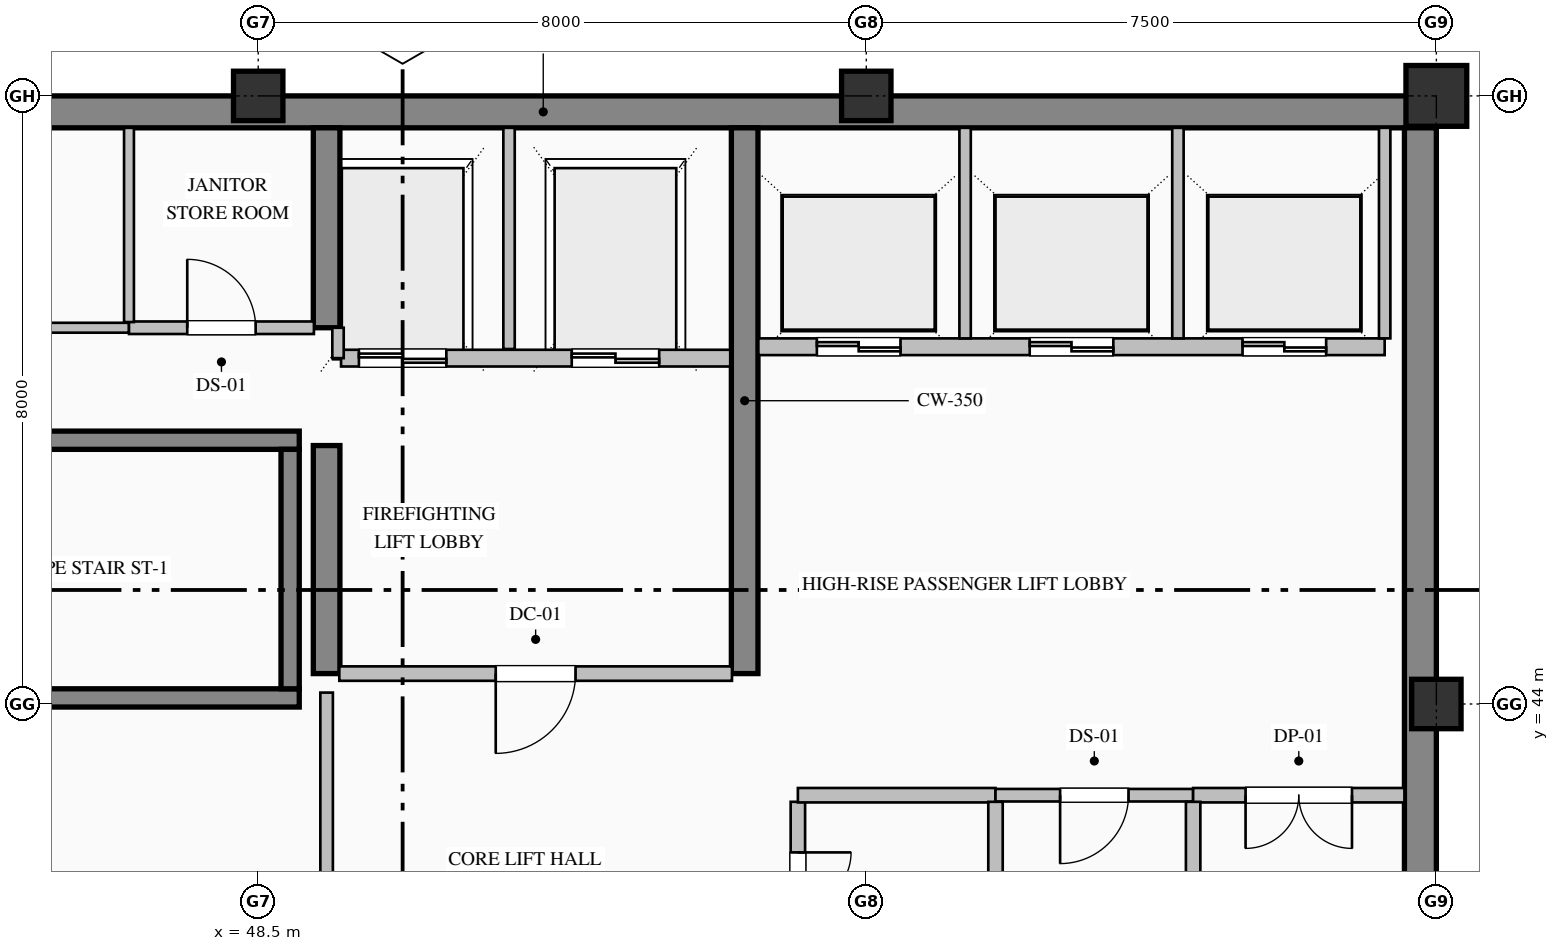
"""IFC4 building model, lengths in metres.
Left out: names, types, materials, properties, quantities, classifications, styles, units other than length and angle.
Written with IfcOpenShell. Run it as: python <this file> out.ifc"""

import sys

from ifc_helpers import new_model, si_unit, direction, frame, frame_2d, origin, origin_2d, place, context, subcontext, project, spatial, rectangle, hollow_rectangle, extrude, element, fill, save


model = new_model("IFC4")
c1 = context("Model", 3, precision=1e-05, world=origin(), true_north=direction((0.0, 1.0)))
c2 = subcontext(c1, "Body", "Model", "MODEL_VIEW")
j1 = project(units=[si_unit("LENGTHUNIT", "METRE"), si_unit("PLANEANGLEUNIT", "RADIAN")], contexts=[c1])
p1 = place(None, origin())
s1 = spatial("IfcSite", under=j1, at=p1, CompositionType="ELEMENT")
p2 = place(p1, origin())
s2 = spatial("IfcBuilding", under=s1, at=p2, CompositionType="ELEMENT")
p3 = place(p2, frame((0.0, 0.0, 291.2)))
s3 = spatial("IfcBuildingStorey", under=s2, at=p3, CompositionType="ELEMENT", Elevation=291.2)
p4 = place(p3, frame((40.5, 51.79, 0.0), z_axis=(0.0, 0.0, 1.0), x_axis=(1.0, 0.0, 0.0)))
e1 = element("IfcWall", 1, at=p4, inside=s3, PredefinedType="SHEAR", context=c2, shape_type="SweptSolid", body=[
    extrude(rectangle(XDim=23.5, YDim=0.42, at=frame_2d((11.75, 0.0))), origin(), (0.0, 0.0, 1.0), 3.785),
])
p5 = place(p3, frame((63.79, 36.32, 0.0), z_axis=(0.0, 0.0, 1.0), x_axis=(0.0, 1.0, 0.0)))
e2 = element("IfcWall", 2, at=p5, inside=s3, PredefinedType="SHEAR", context=c2, shape_type="SweptSolid", body=[
    extrude(rectangle(XDim=15.26, YDim=0.42, at=frame_2d((7.63, 0.0))), origin(), (0.0, 0.0, 1.0), 3.785),
])
p6 = place(p3, frame((49.4, 44.4, 0.0), z_axis=(0.0, 0.0, 1.0), x_axis=(0.0, 1.0, 0.0)))
e3 = element("IfcWall", 3, at=p6, inside=s3, PredefinedType="SHEAR", context=c2, shape_type="SweptSolid", body=[
    extrude(rectangle(XDim=3.0, YDim=0.35, at=frame_2d((1.5, 0.0))), origin(), (0.0, 0.0, 1.0), 3.785),
])
p7 = place(p3, frame((49.4, 48.95, 0.0), z_axis=(0.0, 0.0, 1.0), x_axis=(0.0, 1.0, 0.0)))
e4 = element("IfcWall", 4, at=p7, inside=s3, PredefinedType="SHEAR", context=c2, shape_type="SweptSolid", body=[
    extrude(rectangle(XDim=2.63, YDim=0.35, at=frame_2d((1.315, 0.0))), origin(), (0.0, 0.0, 1.0), 3.785),
])
p8 = place(p3, frame((54.9, 44.4, 0.0), z_axis=(0.0, 0.0, 1.0), x_axis=(0.0, 1.0, 0.0)))
e5 = element("IfcWall", 5, at=p8, inside=s3, PredefinedType="SHEAR", context=c2, shape_type="SweptSolid", body=[
    extrude(rectangle(XDim=7.18, YDim=0.35, at=frame_2d((3.59, 0.0))), origin(), (0.0, 0.0, 1.0), 3.785),
])
for number, where, z_axis, x_axis in (
    (6, (48.5, 52.0, 0.0), (0.0, 0.0, 1.0), (1.0, 0.0, 0.0)),
    (7, (56.5, 52.0, 0.0), (0.0, 0.0, 1.0), (1.0, 0.0, 0.0)),
    (8, (64.0, 44.0, 0.0), (0.0, 0.0, 1.0), (1.0, 0.0, 0.0)),
):
    element("IfcColumn", number, at=place(p3, frame(where, z_axis=z_axis, x_axis=x_axis)), inside=s3, PredefinedType="COLUMN", context=c2, shape_type="SweptSolid", body=[
        extrude(hollow_rectangle(XDim=0.65, YDim=0.65, WallThickness=0.028, at=origin_2d()), origin(), (0.0, 0.0, 1.0), 4.0),
    ])
p9 = place(p3, frame((64.0, 52.0, 0.0), z_axis=(0.0, 0.0, 1.0), x_axis=(1.0, 0.0, 0.0)))
e9 = element("IfcColumn", 9, at=p9, inside=s3, PredefinedType="COLUMN", context=c2, shape_type="SweptSolid", body=[
    extrude(hollow_rectangle(XDim=0.8, YDim=0.8, WallThickness=0.032, at=origin_2d()), origin(), (0.0, 0.0, 1.0), 4.0),
])
for number, where, z_axis, x_axis in (
    (10, (40.96, 47.47, 0.0), (0.0, 0.0, 1.0), (1.0, 0.0, 0.0)),
    (11, (49.04, 44.08, 0.0), (0.0, 0.0, 1.0), (-1.0, 0.0, 0.0)),
):
    element("IfcWall", number, at=place(p3, frame(where, z_axis=z_axis, x_axis=x_axis)), inside=s3, PredefinedType="SOLIDWALL", context=c2, shape_type="SweptSolid", body=[
        extrude(rectangle(XDim=8.08, YDim=0.24, at=frame_2d((4.04, 0.0))), origin(), (0.0, 0.0, 1.0), 4.0),
    ])
p10 = place(p3, frame((48.92, 44.2, 0.0), z_axis=(0.0, 0.0, 1.0), x_axis=(0.0, 1.0, 0.0)))
e12 = element("IfcWall", 12, at=p10, inside=s3, PredefinedType="SOLIDWALL", context=c2, shape_type="SweptSolid", body=[
    extrude(rectangle(XDim=3.15, YDim=0.24, at=frame_2d((1.575, 0.0))), origin(), (0.0, 0.0, 1.0), 4.0),
])
p11 = place(p3, frame((54.71, 48.55, 0.0), z_axis=(0.0, 0.0, 1.0), x_axis=(-1.0, 0.0, 0.0)))
e13 = element("IfcWall", 13, at=p11, inside=s3, PredefinedType="PARTITIONING", context=c2, shape_type="SweptSolid", body=[
    extrude(rectangle(XDim=5.12, YDim=0.22, at=frame_2d((2.56, 0.0))), origin(), (0.0, 0.0, 1.0), 3.785),
])
p12 = place(p11, frame((3.735, 0.0, 0.0)))
e14 = element("IfcOpeningElement", 14, at=p12, cuts=e13, PredefinedType="OPENING", context=c2, shape_type="SweptSolid", body=[
    extrude(rectangle(XDim=1.15, YDim=2.2, at=frame_2d((0.575, 1.1))), frame((0.0, 0.12, 0.0), z_axis=(0.0, -1.0, 0.0), x_axis=(1.0, 0.0, 0.0)), (0.0, 0.0, 1.0), 0.24),
])
p13 = place(p11, frame((0.935, 0.0, 0.0)))
e15 = element("IfcOpeningElement", 15, at=p13, cuts=e13, PredefinedType="OPENING", context=c2, shape_type="SweptSolid", body=[
    extrude(rectangle(XDim=1.15, YDim=2.2, at=frame_2d((0.575, 1.1))), frame((0.0, 0.12, 0.0), z_axis=(0.0, -1.0, 0.0), x_axis=(1.0, 0.0, 0.0)), (0.0, 0.0, 1.0), 0.24),
])
p14 = place(p3, frame((51.8, 48.67, 0.0), z_axis=(0.0, 0.0, 1.0), x_axis=(0.0, 1.0, 0.0)))
e16 = element("IfcWall", 16, at=p14, inside=s3, PredefinedType="PARTITIONING", context=c2, shape_type="SweptSolid", body=[
    extrude(rectangle(XDim=2.91, YDim=0.15, at=frame_2d((1.455, 0.0))), origin(), (0.0, 0.0, 1.0), 3.785),
])
p15 = place(p3, frame((49.55, 48.55, 0.0), z_axis=(0.0, 0.0, 1.0), x_axis=(0.0, 1.0, 0.0)))
e17 = element("IfcWall", 17, at=p15, inside=s3, PredefinedType="PARTITIONING", context=c2, shape_type="SweptSolid", body=[
    extrude(rectangle(XDim=0.4, YDim=0.15, at=frame_2d((0.2, 0.0))), origin(), (0.0, 0.0, 1.0), 3.785),
])
p16 = place(p3, frame((63.32, 48.7, 0.0), z_axis=(0.0, 0.0, 1.0), x_axis=(-1.0, 0.0, 0.0)))
e18 = element("IfcWall", 18, at=p16, inside=s3, PredefinedType="PARTITIONING", context=c2, shape_type="SweptSolid", body=[
    extrude(rectangle(XDim=8.24, YDim=0.22, at=frame_2d((4.12, 0.0))), origin(), (0.0, 0.0, 1.0), 3.785),
])
p17 = place(p16, frame((6.37, 0.0, 0.0)))
e19 = element("IfcOpeningElement", 19, at=p17, cuts=e18, PredefinedType="OPENING", context=c2, shape_type="SweptSolid", body=[
    extrude(rectangle(XDim=1.1, YDim=2.2, at=frame_2d((0.55, 1.1))), frame((0.0, 0.12, 0.0), z_axis=(0.0, -1.0, 0.0), x_axis=(1.0, 0.0, 0.0)), (0.0, 0.0, 1.0), 0.24),
])
p18 = place(p16, frame((3.57, 0.0, 0.0)))
e20 = element("IfcOpeningElement", 20, at=p18, cuts=e18, PredefinedType="OPENING", context=c2, shape_type="SweptSolid", body=[
    extrude(rectangle(XDim=1.1, YDim=2.2, at=frame_2d((0.55, 1.1))), frame((0.0, 0.12, 0.0), z_axis=(0.0, -1.0, 0.0), x_axis=(1.0, 0.0, 0.0)), (0.0, 0.0, 1.0), 0.24),
])
p19 = place(p16, frame((0.77, 0.0, 0.0)))
e21 = element("IfcOpeningElement", 21, at=p19, cuts=e18, PredefinedType="OPENING", context=c2, shape_type="SweptSolid", body=[
    extrude(rectangle(XDim=1.1, YDim=2.2, at=frame_2d((0.55, 1.1))), frame((0.0, 0.12, 0.0), z_axis=(0.0, -1.0, 0.0), x_axis=(1.0, 0.0, 0.0)), (0.0, 0.0, 1.0), 0.24),
])
for number, where, z_axis, x_axis in (
    (22, (57.8, 48.81, 0.0), (0.0, 0.0, 1.0), (0.0, 1.0, 0.0)),
    (23, (60.6, 48.81, 0.0), (0.0, 0.0, 1.0), (0.0, 1.0, 0.0)),
    (24, (63.32, 48.81, 0.0), (0.0, 0.0, 1.0), (0.0, 1.0, 0.0)),
):
    element("IfcWall", number, at=place(p3, frame(where, z_axis=z_axis, x_axis=x_axis)), inside=s3, PredefinedType="PARTITIONING", context=c2, shape_type="SweptSolid", body=[
        extrude(rectangle(XDim=2.77, YDim=0.15, at=frame_2d((1.385, 0.0))), origin(), (0.0, 0.0, 1.0), 3.785),
    ])
p20 = place(p3, frame((40.92, 48.95, 0.0), z_axis=(0.0, 0.0, 1.0), x_axis=(1.0, 0.0, 0.0)))
e25 = element("IfcWall", 25, at=p20, inside=s3, PredefinedType="PARTITIONING", context=c2, shape_type="SweptSolid", body=[
    extrude(rectangle(XDim=5.88, YDim=0.13, at=frame_2d((2.94, 0.0))), origin(), (0.0, 0.0, 1.0), 3.785),
])
p21 = place(p20, frame((2.48, 0.0, 0.0)))
e26 = element("IfcOpeningElement", 26, at=p21, cuts=e25, PredefinedType="OPENING", context=c2, shape_type="SweptSolid", body=[
    extrude(rectangle(XDim=0.92, YDim=2.15, at=frame_2d((0.46, 1.075))), frame((0.0, 0.075, 0.0), z_axis=(0.0, -1.0, 0.0), x_axis=(1.0, 0.0, 0.0)), (0.0, 0.0, 1.0), 0.15),
])
p22 = place(p3, frame((46.8, 48.95, 0.0), z_axis=(0.0, 0.0, 1.0), x_axis=(1.0, 0.0, 0.0)))
e27 = element("IfcWall", 27, at=p22, inside=s3, PredefinedType="PARTITIONING", context=c2, shape_type="SweptSolid", body=[
    extrude(rectangle(XDim=2.433, YDim=0.165, at=frame_2d((1.216, 0.0))), origin(), (0.0, 0.0, 1.0), 3.785),
])
p23 = place(p22, frame((0.767, 0.0, 0.0)))
e28 = element("IfcOpeningElement", 28, at=p23, cuts=e27, PredefinedType="OPENING", context=c2, shape_type="SweptSolid", body=[
    extrude(rectangle(XDim=0.9, YDim=2.15, at=frame_2d((0.45, 1.075))), frame((0.0, 0.093, 0.0), z_axis=(0.0, -1.0, 0.0), x_axis=(1.0, 0.0, 0.0)), (0.0, 0.0, 1.0), 0.185),
])
p24 = place(p3, frame((54.733, 44.4, 0.0), z_axis=(0.0, 0.0, 1.0), x_axis=(-1.0, 0.0, 0.0)))
e29 = element("IfcWall", 29, at=p24, inside=s3, PredefinedType="PARTITIONING", context=c2, shape_type="SweptSolid", body=[
    extrude(rectangle(XDim=5.166, YDim=0.19, at=frame_2d((2.583, 0.0))), origin(), (0.0, 0.0, 1.0), 3.785),
])
p25 = place(p24, frame((2.058, 0.0, 0.0)))
e30 = element("IfcOpeningElement", 30, at=p25, cuts=e29, PredefinedType="OPENING", context=c2, shape_type="SweptSolid", body=[
    extrude(rectangle(XDim=1.05, YDim=2.15, at=frame_2d((0.525, 1.075))), frame((0.0, 0.105, 0.0), z_axis=(0.0, -1.0, 0.0), x_axis=(1.0, 0.0, 0.0)), (0.0, 0.0, 1.0), 0.21),
])
p26 = place(p3, frame((49.4, 36.42, 0.0), z_axis=(0.0, 0.0, 1.0), x_axis=(0.0, 1.0, 0.0)))
e31 = element("IfcWall", 31, at=p26, inside=s3, PredefinedType="PARTITIONING", context=c2, shape_type="SweptSolid", body=[
    extrude(rectangle(XDim=7.73, YDim=0.165, at=frame_2d((3.865, 0.0))), origin(), (0.0, 0.0, 1.0), 3.027),
])
p27 = place(p26, frame((3.365, 0.0, 0.0)))
e32 = element("IfcOpeningElement", 32, at=p27, cuts=e31, PredefinedType="OPENING", context=c2, shape_type="SweptSolid", body=[
    extrude(rectangle(XDim=1.0, YDim=2.15, at=frame_2d((0.5, 1.075))), frame((0.0, 0.093, 0.0), z_axis=(0.0, -1.0, 0.0), x_axis=(1.0, 0.0, 0.0)), (0.0, 0.0, 1.0), 0.185),
])
p28 = place(p3, frame((55.6, 42.713, 0.0), z_axis=(0.0, 0.0, 1.0), x_axis=(0.0, -1.0, 0.0)))
e33 = element("IfcWall", 33, at=p28, inside=s3, PredefinedType="PARTITIONING", context=c2, shape_type="SweptSolid", body=[
    extrude(rectangle(XDim=2.731, YDim=0.19, at=frame_2d((1.365, 0.0))), origin(), (0.0, 0.0, 1.0), 3.785),
])
p29 = place(p28, frame((0.666, 0.0, 0.0)))
e34 = element("IfcOpeningElement", 34, at=p29, cuts=e33, PredefinedType="OPENING", context=c2, shape_type="SweptSolid", body=[
    extrude(rectangle(XDim=1.4, YDim=2.25, at=frame_2d((0.7, 1.125))), frame((0.0, 0.105, 0.0), z_axis=(0.0, -1.0, 0.0), x_axis=(1.0, 0.0, 0.0)), (0.0, 0.0, 1.0), 0.21),
])
p30 = place(p3, frame((58.2, 42.8, 0.0), z_axis=(0.0, 0.0, 1.0), x_axis=(-1.0, 0.0, 0.0)))
e35 = element("IfcWall", 35, at=p30, inside=s3, PredefinedType="PARTITIONING", context=c2, shape_type="SweptSolid", body=[
    extrude(rectangle(XDim=2.6, YDim=0.19, at=frame_2d((1.3, 0.0))), origin(), (0.0, 0.0, 1.0), 3.785),
])
p31 = place(p3, frame((60.8, 42.8, 0.0), z_axis=(0.0, 0.0, 1.0), x_axis=(-1.0, 0.0, 0.0)))
e36 = element("IfcWall", 36, at=p31, inside=s3, PredefinedType="PARTITIONING", context=c2, shape_type="SweptSolid", body=[
    extrude(rectangle(XDim=2.6, YDim=0.165, at=frame_2d((1.3, 0.0))), origin(), (0.0, 0.0, 1.0), 3.785),
])
p32 = place(p31, frame((0.85, 0.0, 0.0)))
e37 = element("IfcOpeningElement", 37, at=p32, cuts=e36, PredefinedType="OPENING", context=c2, shape_type="SweptSolid", body=[
    extrude(rectangle(XDim=0.9, YDim=2.15, at=frame_2d((0.45, 1.075))), frame((0.0, 0.093, 0.0), z_axis=(0.0, -1.0, 0.0), x_axis=(1.0, 0.0, 0.0)), (0.0, 0.0, 1.0), 0.185),
])
p33 = place(p3, frame((63.58, 42.8, 0.0), z_axis=(0.0, 0.0, 1.0), x_axis=(-1.0, 0.0, 0.0)))
e38 = element("IfcWall", 38, at=p33, inside=s3, PredefinedType="PARTITIONING", context=c2, shape_type="SweptSolid", body=[
    extrude(rectangle(XDim=2.78, YDim=0.19, at=frame_2d((1.39, 0.0))), origin(), (0.0, 0.0, 1.0), 3.785),
])
p34 = place(p33, frame((0.69, 0.0, 0.0)))
e39 = element("IfcOpeningElement", 39, at=p34, cuts=e38, PredefinedType="OPENING", context=c2, shape_type="SweptSolid", body=[
    extrude(rectangle(XDim=1.4, YDim=2.25, at=frame_2d((0.7, 1.125))), frame((0.0, 0.105, 0.0), z_axis=(0.0, -1.0, 0.0), x_axis=(1.0, 0.0, 0.0)), (0.0, 0.0, 1.0), 0.21),
])
p35 = place(p3, frame((46.8, 51.58, 0.0), z_axis=(0.0, 0.0, 1.0), x_axis=(0.0, -1.0, 0.0)))
e40 = element("IfcWall", 40, at=p35, inside=s3, PredefinedType="PARTITIONING", context=c2, shape_type="SweptSolid", body=[
    extrude(rectangle(XDim=2.556, YDim=0.13, at=frame_2d((1.278, 0.0))), origin(), (0.0, 0.0, 1.0), 3.785),
])
for number, where, z_axis, x_axis in (
    (41, (58.2, 42.713, 0.0), (0.0, 0.0, 1.0), (0.0, -1.0, 0.0)),
    (42, (60.8, 42.713, 0.0), (0.0, 0.0, 1.0), (0.0, -1.0, 0.0)),
):
    element("IfcWall", number, at=place(p3, frame(where, z_axis=z_axis, x_axis=x_axis)), inside=s3, PredefinedType="PARTITIONING", context=c2, shape_type="SweptSolid", body=[
        extrude(rectangle(XDim=2.731, YDim=0.19, at=frame_2d((1.365, 0.0))), origin(), (0.0, 0.0, 1.0), 3.785),
    ])
p36 = place(p12, origin())
e43 = element("IfcDoor", 43, at=p36, inside=s3, OperationType="DOUBLE_DOOR_SLIDING", PredefinedType="DOOR", context=c2, shape_type="SweptSolid", body=[
    extrude(rectangle(XDim=1.15, YDim=2.2, at=frame_2d((0.575, 1.1))), frame((0.0, 0.025, 0.0), z_axis=(0.0, -1.0, 0.0), x_axis=(1.0, 0.0, 0.0)), (0.0, 0.0, 1.0), 0.05),
])
fill(e14, e43)
p37 = place(p13, origin())
e44 = element("IfcDoor", 44, at=p37, inside=s3, OperationType="DOUBLE_DOOR_SLIDING", PredefinedType="DOOR", context=c2, shape_type="SweptSolid", body=[
    extrude(rectangle(XDim=1.15, YDim=2.2, at=frame_2d((0.575, 1.1))), frame((0.0, 0.025, 0.0), z_axis=(0.0, -1.0, 0.0), x_axis=(1.0, 0.0, 0.0)), (0.0, 0.0, 1.0), 0.05),
])
fill(e15, e44)
p38 = place(p17, origin())
e45 = element("IfcDoor", 45, at=p38, inside=s3, OperationType="DOUBLE_DOOR_SLIDING", PredefinedType="DOOR", context=c2, shape_type="SweptSolid", body=[
    extrude(rectangle(XDim=1.1, YDim=2.2, at=frame_2d((0.55, 1.1))), frame((0.0, 0.025, 0.0), z_axis=(0.0, -1.0, 0.0), x_axis=(1.0, 0.0, 0.0)), (0.0, 0.0, 1.0), 0.05),
])
fill(e19, e45)
p39 = place(p18, origin())
e46 = element("IfcDoor", 46, at=p39, inside=s3, OperationType="DOUBLE_DOOR_SLIDING", PredefinedType="DOOR", context=c2, shape_type="SweptSolid", body=[
    extrude(rectangle(XDim=1.1, YDim=2.2, at=frame_2d((0.55, 1.1))), frame((0.0, 0.025, 0.0), z_axis=(0.0, -1.0, 0.0), x_axis=(1.0, 0.0, 0.0)), (0.0, 0.0, 1.0), 0.05),
])
fill(e20, e46)
p40 = place(p19, origin())
e47 = element("IfcDoor", 47, at=p40, inside=s3, OperationType="DOUBLE_DOOR_SLIDING", PredefinedType="DOOR", context=c2, shape_type="SweptSolid", body=[
    extrude(rectangle(XDim=1.1, YDim=2.2, at=frame_2d((0.55, 1.1))), frame((0.0, 0.025, 0.0), z_axis=(0.0, -1.0, 0.0), x_axis=(1.0, 0.0, 0.0)), (0.0, 0.0, 1.0), 0.05),
])
fill(e21, e47)
p41 = place(p25, origin())
e48 = element("IfcDoor", 48, at=p41, inside=s3, OperationType="SINGLE_SWING_RIGHT", PredefinedType="DOOR", context=c2, shape_type="SweptSolid", body=[
    extrude(rectangle(XDim=1.05, YDim=2.15, at=frame_2d((0.525, 1.075))), frame((0.0, 0.025, 0.0), z_axis=(0.0, -1.0, 0.0), x_axis=(1.0, 0.0, 0.0)), (0.0, 0.0, 1.0), 0.05),
])
fill(e30, e48)
p42 = place(p23, origin())
e49 = element("IfcDoor", 49, at=p42, inside=s3, OperationType="SINGLE_SWING_LEFT", PredefinedType="DOOR", context=c2, shape_type="SweptSolid", body=[
    extrude(rectangle(XDim=0.9, YDim=2.15, at=frame_2d((0.45, 1.075))), frame((0.0, 0.025, 0.0), z_axis=(0.0, -1.0, 0.0), x_axis=(1.0, 0.0, 0.0)), (0.0, 0.0, 1.0), 0.05),
])
fill(e28, e49)
p43 = place(p29, origin())
e50 = element("IfcDoor", 50, at=p43, inside=s3, OperationType="DOUBLE_DOOR_SINGLE_SWING", PredefinedType="DOOR", context=c2, shape_type="SweptSolid", body=[
    extrude(rectangle(XDim=1.4, YDim=2.25, at=frame_2d((0.7, 1.125))), frame((0.0, 0.025, 0.0), z_axis=(0.0, -1.0, 0.0), x_axis=(1.0, 0.0, 0.0)), (0.0, 0.0, 1.0), 0.05),
])
fill(e34, e50)
p44 = place(p32, origin())
e51 = element("IfcDoor", 51, at=p44, inside=s3, OperationType="SINGLE_SWING_RIGHT", PredefinedType="DOOR", context=c2, shape_type="SweptSolid", body=[
    extrude(rectangle(XDim=0.9, YDim=2.15, at=frame_2d((0.45, 1.075))), frame((0.0, 0.025, 0.0), z_axis=(0.0, -1.0, 0.0), x_axis=(1.0, 0.0, 0.0)), (0.0, 0.0, 1.0), 0.05),
])
fill(e37, e51)
p45 = place(p34, origin())
e52 = element("IfcDoor", 52, at=p45, inside=s3, OperationType="DOUBLE_DOOR_SINGLE_SWING", PredefinedType="DOOR", context=c2, shape_type="SweptSolid", body=[
    extrude(rectangle(XDim=1.4, YDim=2.25, at=frame_2d((0.7, 1.125))), frame((0.0, 0.025, 0.0), z_axis=(0.0, -1.0, 0.0), x_axis=(1.0, 0.0, 0.0)), (0.0, 0.0, 1.0), 0.05),
])
fill(e39, e52)
save(model, sys.argv[1])
